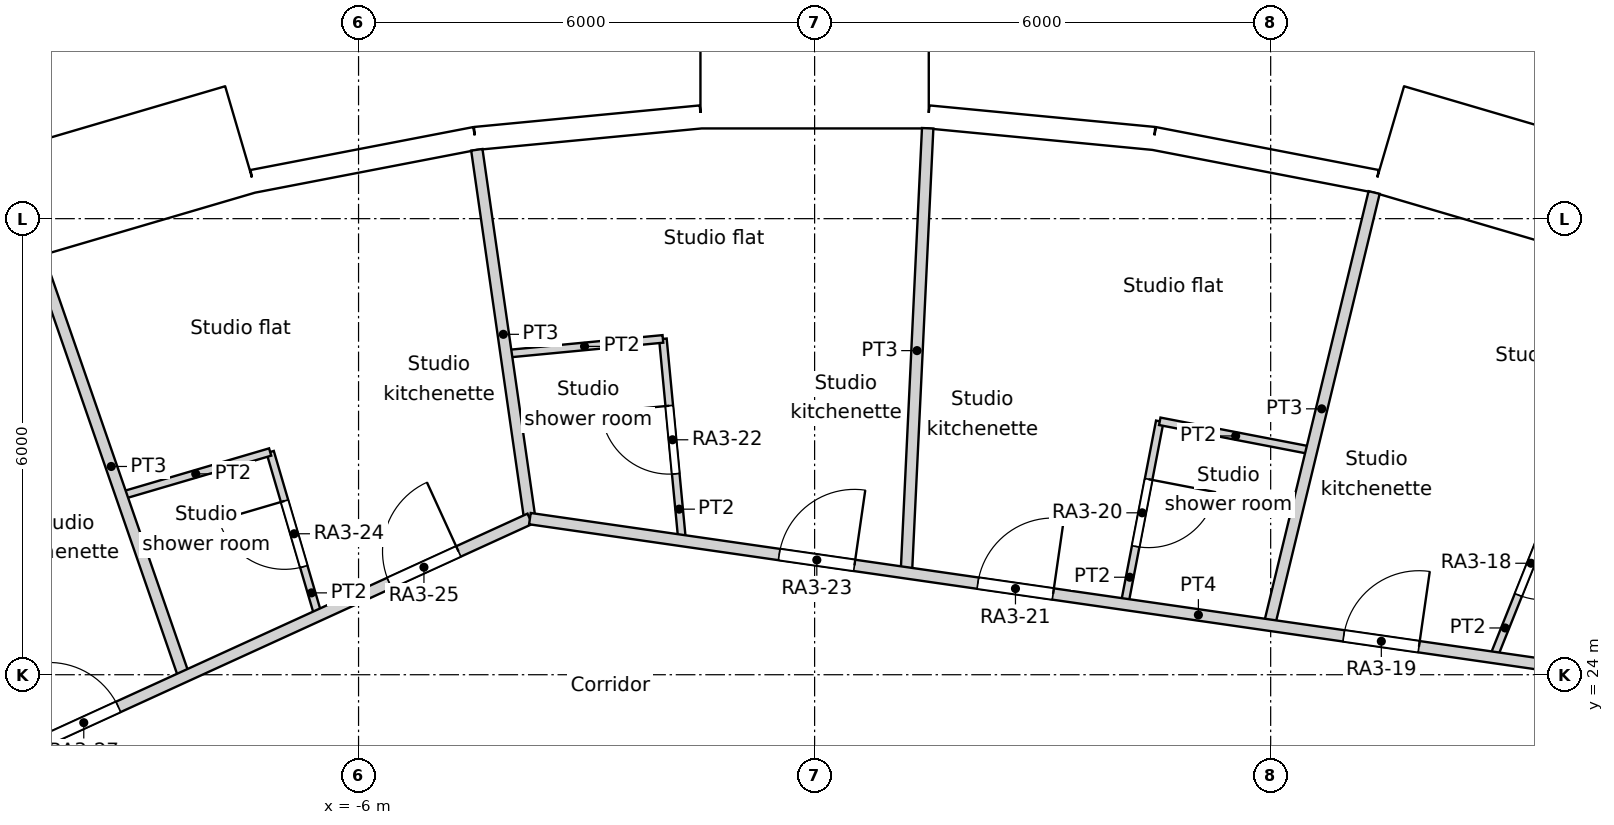
"""IFC4 building model, lengths in metres.
Left out: names, types, materials, properties, quantities, classifications, styles, units other than length and angle.
Written with IfcOpenShell. Run it as: python <this file> out.ifc"""

import sys

from ifc_helpers import new_model, si_unit, direction, frame, frame_2d, origin, origin_2d, place, context, subcontext, project, spatial, rectangle, circle, extrude, element, fill, save


model = new_model("IFC4")
c1 = context("Model", 3, precision=1e-05, world=origin(), true_north=direction((0.0, 1.0)))
c2 = subcontext(c1, "Body", "Model", "MODEL_VIEW")
j1 = project(units=[si_unit("LENGTHUNIT", "METRE"), si_unit("PLANEANGLEUNIT", "RADIAN")], contexts=[c1])
p1 = place(None, origin())
s1 = spatial("IfcSite", under=j1, at=p1, CompositionType="ELEMENT")
p2 = place(p1, origin())
s2 = spatial("IfcBuilding", under=s1, at=p2, CompositionType="ELEMENT")
p3 = place(p2, frame((0.0, 0.0, 49.8)))
s3 = spatial("IfcBuildingStorey", under=s2, at=p3, CompositionType="ELEMENT", Elevation=49.8)
for number, where, z_axis, x_axis in (
    (1, (7.137, 29.421, 0.0), (0.0, 0.0, 1.0), (1.0, 0.0, 0.0)),
    (2, (1.44, 30.24, 0.0), (0.0, 0.0, 1.0), (1.0, 0.0, 0.0)),
    (3, (-4.309, 29.966, 0.0), (0.0, 0.0, 1.0), (1.0, 0.0, 0.0)),
    (4, (-9.902, 28.61, 0.0), (0.0, 0.0, 1.0), (1.0, 0.0, 0.0)),
):
    element("IfcColumn", number, at=place(p3, frame(where, z_axis=z_axis, x_axis=x_axis)), inside=s3, PredefinedType="COLUMN", context=c2, shape_type="SweptSolid", body=[
        extrude(circle(Radius=0.7, at=origin_2d()), origin(), (0.0, 0.0, 1.0), 3.6),
    ])
for number, where, z_axis, x_axis in (
    (5, (9.723, 22.54, 0.0), (0.0, 0.0, 1.0), (1.0, 0.0, 0.0)),
    (6, (4.263, 24.175, 0.0), (0.0, 0.0, 1.0), (1.0, 0.0, 0.0)),
    (7, (-1.427, 24.506, 0.0), (0.0, 0.0, 1.0), (1.0, 0.0, 0.0)),
    (8, (-7.04, 23.516, 0.0), (0.0, 0.0, 1.0), (1.0, 0.0, 0.0)),
):
    element("IfcColumn", number, at=place(p3, frame(where, z_axis=z_axis, x_axis=x_axis)), inside=s3, PredefinedType="COLUMN", context=c2, shape_type="SweptSolid", body=[
        extrude(circle(Radius=0.75, at=origin_2d()), origin(), (0.0, 0.0, 1.0), 3.6),
    ])
p4 = place(p3, frame((10.43, 30.198, -0.45), z_axis=(0.0, 0.0, 1.0), x_axis=(-0.959489813418, 0.281743319258, 0.0)))
e9 = element("IfcWall", 9, at=p4, inside=s3, PredefinedType="ELEMENTEDWALL", context=c2, shape_type="SweptSolid", body=[
    extrude(rectangle(XDim=3.0, YDim=1.45, at=frame_2d((1.5, 0.0))), origin(), (0.0, 0.0, 1.0), 3.6),
])
p5 = place(p4, frame((1.5, 0.0, 2.0)))
e10 = element("IfcOpeningElement", 10, at=p5, cuts=e9, PredefinedType="OPENING", context=c2, shape_type="SweptSolid", body=[
    extrude(circle(Radius=0.9, at=origin_2d()), frame((0.0, 0.735, 0.0), z_axis=(0.0, -1.0, 0.0), x_axis=(1.0, 0.0, 0.0)), (0.0, 0.0, 1.0), 1.47),
])
p6 = place(p3, frame((7.391, 30.491, 0.0), z_axis=(0.0, 0.0, 1.0), x_axis=(-0.981924535406, 0.189272836848, 0.0)))
e11 = element("IfcWall", 11, at=p6, inside=s3, PredefinedType="SOLIDWALL", context=c2, shape_type="SweptSolid", body=[
    extrude(rectangle(XDim=2.98, YDim=0.3, at=frame_2d((1.49, 0.0))), origin(), (0.0, 0.0, 1.0), 3.15),
])
p7 = place(p6, frame((1.49, 0.0, 1.55)))
e12 = element("IfcOpeningElement", 12, at=p7, cuts=e11, PredefinedType="OPENING", context=c2, shape_type="SweptSolid", body=[
    extrude(circle(Radius=0.9, at=origin_2d()), frame((0.0, 0.16, 0.0), z_axis=(0.0, -1.0, 0.0), x_axis=(1.0, 0.0, 0.0)), (0.0, 0.0, 1.0), 0.32),
])
p8 = place(p3, frame((4.465, 31.055, 0.0), z_axis=(0.0, 0.0, 1.0), x_axis=(-0.995473351551, 0.095041077185, 0.0)))
e13 = element("IfcWall", 13, at=p8, inside=s3, PredefinedType="SOLIDWALL", context=c2, shape_type="SweptSolid", body=[
    extrude(rectangle(XDim=2.98, YDim=0.3, at=frame_2d((1.49, 0.0))), origin(), (0.0, 0.0, 1.0), 3.15),
])
p9 = place(p8, frame((1.49, 0.0, 1.55)))
e14 = element("IfcOpeningElement", 14, at=p9, cuts=e13, PredefinedType="OPENING", context=c2, shape_type="SweptSolid", body=[
    extrude(circle(Radius=0.9, at=origin_2d()), frame((0.0, 0.16, 0.0), z_axis=(0.0, -1.0, 0.0), x_axis=(1.0, 0.0, 0.0)), (0.0, 0.0, 1.0), 0.32),
])
p10 = place(p3, frame((1.5, 31.914, -0.45), z_axis=(0.0, 0.0, 1.0), x_axis=(-1.0, 0.0, 0.0)))
e15 = element("IfcWall", 15, at=p10, inside=s3, PredefinedType="ELEMENTEDWALL", context=c2, shape_type="SweptSolid", body=[
    extrude(rectangle(XDim=3.0, YDim=1.45, at=frame_2d((1.5, 0.0))), origin(), (0.0, 0.0, 1.0), 3.6),
])
p11 = place(p10, frame((1.5, 0.0, 2.0)))
e16 = element("IfcOpeningElement", 16, at=p11, cuts=e15, PredefinedType="OPENING", context=c2, shape_type="SweptSolid", body=[
    extrude(circle(Radius=0.9, at=origin_2d()), frame((0.0, 0.735, 0.0), z_axis=(0.0, -1.0, 0.0), x_axis=(1.0, 0.0, 0.0)), (0.0, 0.0, 1.0), 1.47),
])
p12 = place(p3, frame((-1.499, 31.338, 0.0), z_axis=(0.0, 0.0, 1.0), x_axis=(-0.995473351551, -0.095041077185, 0.0)))
e17 = element("IfcWall", 17, at=p12, inside=s3, PredefinedType="SOLIDWALL", context=c2, shape_type="SweptSolid", body=[
    extrude(rectangle(XDim=2.98, YDim=0.3, at=frame_2d((1.49, 0.0))), origin(), (0.0, 0.0, 1.0), 3.15),
])
p13 = place(p12, frame((1.49, 0.0, 1.55)))
e18 = element("IfcOpeningElement", 18, at=p13, cuts=e17, PredefinedType="OPENING", context=c2, shape_type="SweptSolid", body=[
    extrude(circle(Radius=0.9, at=origin_2d()), frame((0.0, 0.16, 0.0), z_axis=(0.0, -1.0, 0.0), x_axis=(1.0, 0.0, 0.0)), (0.0, 0.0, 1.0), 0.32),
])
p14 = place(p3, frame((-4.465, 31.055, 0.0), z_axis=(0.0, 0.0, 1.0), x_axis=(-0.981924535406, -0.189272836848, 0.0)))
e19 = element("IfcWall", 19, at=p14, inside=s3, PredefinedType="SOLIDWALL", context=c2, shape_type="SweptSolid", body=[
    extrude(rectangle(XDim=2.98, YDim=0.3, at=frame_2d((1.49, 0.0))), origin(), (0.0, 0.0, 1.0), 3.15),
])
p15 = place(p14, frame((1.49, 0.0, 1.55)))
e20 = element("IfcOpeningElement", 20, at=p15, cuts=e19, PredefinedType="OPENING", context=c2, shape_type="SweptSolid", body=[
    extrude(circle(Radius=0.9, at=origin_2d()), frame((0.0, 0.16, 0.0), z_axis=(0.0, -1.0, 0.0), x_axis=(1.0, 0.0, 0.0)), (0.0, 0.0, 1.0), 0.32),
])
p16 = place(p3, frame((-7.552, 31.044, -0.45), z_axis=(0.0, 0.0, 1.0), x_axis=(-0.959489813418, -0.281743319258, 0.0)))
e21 = element("IfcWall", 21, at=p16, inside=s3, PredefinedType="ELEMENTEDWALL", context=c2, shape_type="SweptSolid", body=[
    extrude(rectangle(XDim=3.0, YDim=1.45, at=frame_2d((1.5, 0.0))), origin(), (0.0, 0.0, 1.0), 3.6),
])
p17 = place(p16, frame((1.5, 0.0, 2.0)))
e22 = element("IfcOpeningElement", 22, at=p17, cuts=e21, PredefinedType="OPENING", context=c2, shape_type="SweptSolid", body=[
    extrude(circle(Radius=0.9, at=origin_2d()), frame((0.0, 0.735, 0.0), z_axis=(0.0, -1.0, 0.0), x_axis=(1.0, 0.0, 0.0)), (0.0, 0.0, 1.0), 1.47),
])
p18 = place(p3, frame((-3.746, 26.054, 0.0), z_axis=(0.0, 0.0, 1.0), x_axis=(0.989780545379, -0.142598990138, 0.0)))
e23 = element("IfcWall", 23, at=p18, inside=s3, PredefinedType="PARTITIONING", context=c2, shape_type="SweptSolid", body=[
    extrude(rectangle(XDim=14.83, YDim=0.15, at=frame_2d((7.415, 0.0))), origin(), (0.0, 0.0, 1.0), 3.15),
])
p19 = place(p18, frame((10.817, 0.0, 0.0)))
e24 = element("IfcOpeningElement", 24, at=p19, cuts=e23, PredefinedType="OPENING", context=c2, shape_type="SweptSolid", body=[
    extrude(rectangle(XDim=1.0, YDim=2.1, at=frame_2d((0.5, 1.05))), frame((0.0, 0.075, 0.0), z_axis=(0.0, -1.0, 0.0), x_axis=(1.0, 0.0, 0.0)), (0.0, 0.0, 1.0), 0.15),
])
p20 = place(p18, frame((5.954, 0.0, 0.0)))
e25 = element("IfcOpeningElement", 25, at=p20, cuts=e23, PredefinedType="OPENING", context=c2, shape_type="SweptSolid", body=[
    extrude(rectangle(XDim=1.0, YDim=2.1, at=frame_2d((0.5, 1.05))), frame((0.0, 0.075, 0.0), z_axis=(0.0, -1.0, 0.0), x_axis=(1.0, 0.0, 0.0)), (0.0, 0.0, 1.0), 0.15),
])
p21 = place(p18, frame((3.314, 0.0, 0.0)))
e26 = element("IfcOpeningElement", 26, at=p21, cuts=e23, PredefinedType="OPENING", context=c2, shape_type="SweptSolid", body=[
    extrude(rectangle(XDim=1.0, YDim=2.1, at=frame_2d((0.5, 1.05))), frame((0.0, 0.075, 0.0), z_axis=(0.0, -1.0, 0.0), x_axis=(1.0, 0.0, 0.0)), (0.0, 0.0, 1.0), 0.15),
])
p22 = place(p3, frame((-17.234, 19.888, 0.0), z_axis=(0.0, 0.0, 1.0), x_axis=(0.90953867323, 0.415619299238, 0.0)))
e27 = element("IfcWall", 27, at=p22, inside=s3, PredefinedType="PARTITIONING", context=c2, shape_type="SweptSolid", body=[
    extrude(rectangle(XDim=14.829, YDim=0.15, at=frame_2d((7.415, 0.0))), origin(), (0.0, 0.0, 1.0), 3.15),
])
p23 = place(p22, frame((12.797, 0.0, 0.0)))
e28 = element("IfcOpeningElement", 28, at=p23, cuts=e27, PredefinedType="OPENING", context=c2, shape_type="SweptSolid", body=[
    extrude(rectangle(XDim=1.0, YDim=2.1, at=frame_2d((0.5, 1.05))), frame((0.0, 0.075, 0.0), z_axis=(0.0, -1.0, 0.0), x_axis=(1.0, 0.0, 0.0)), (0.0, 0.0, 1.0), 0.15),
])
p24 = place(p22, frame((7.877, 0.0, 0.0)))
e29 = element("IfcOpeningElement", 29, at=p24, cuts=e27, PredefinedType="OPENING", context=c2, shape_type="SweptSolid", body=[
    extrude(rectangle(XDim=1.0, YDim=2.1, at=frame_2d((0.5, 1.05))), frame((0.0, 0.075, 0.0), z_axis=(0.0, -1.0, 0.0), x_axis=(1.0, 0.0, 0.0)), (0.0, 0.0, 1.0), 0.15),
])
p25 = place(p22, frame((1.604, 0.0, 0.0)))
e30 = element("IfcOpeningElement", 30, at=p25, cuts=e27, PredefinedType="OPENING", context=c2, shape_type="SweptSolid", body=[
    extrude(rectangle(XDim=1.8, YDim=2.1, at=frame_2d((0.9, 1.05))), frame((0.0, 0.075, 0.0), z_axis=(0.0, -1.0, 0.0), x_axis=(1.0, 0.0, 0.0)), (0.0, 0.0, 1.0), 0.15),
])
p26 = place(p3, frame((8.93, 24.228, 0.0), z_axis=(0.0, 0.0, 1.0), x_axis=(0.371564281805, 0.928407229876, 0.0)))
e31 = element("IfcWall", 31, at=p26, inside=s3, PredefinedType="PARTITIONING", context=c2, shape_type="SweptSolid", body=[
    extrude(rectangle(XDim=2.667, YDim=0.1, at=frame_2d((1.333, 0.0))), origin(), (0.0, 0.0, 1.0), 3.15),
])
p27 = place(p26, frame((0.884, 0.0, 0.0)))
e32 = element("IfcOpeningElement", 32, at=p27, cuts=e31, PredefinedType="OPENING", context=c2, shape_type="SweptSolid", body=[
    extrude(rectangle(XDim=0.9, YDim=2.04, at=frame_2d((0.45, 1.02))), frame((0.0, 0.05, 0.0), z_axis=(0.0, -1.0, 0.0), x_axis=(1.0, 0.0, 0.0)), (0.0, 0.0, 1.0), 0.1),
])
p28 = place(p3, frame((5.981, 24.652, 0.0), z_axis=(0.0, 0.0, 1.0), x_axis=(0.235555883074, 0.971860805851, 0.0)))
e33 = element("IfcWall", 33, at=p28, inside=s3, PredefinedType="PARTITIONING", context=c2, shape_type="SweptSolid", body=[
    extrude(rectangle(XDim=5.857, YDim=0.15, at=frame_2d((2.928, 0.0))), origin(), (0.0, 0.0, 1.0), 3.15),
])
p29 = place(p3, frame((4.541, 27.334, 0.0), z_axis=(0.0, 0.0, 1.0), x_axis=(0.981919009751, -0.189301501024, 0.0)))
e34 = element("IfcWall", 34, at=p29, inside=s3, PredefinedType="PARTITIONING", context=c2, shape_type="SweptSolid", body=[
    extrude(rectangle(XDim=2.034, YDim=0.1, at=frame_2d((1.017, 0.0))), origin(), (0.0, 0.0, 1.0), 3.15),
])
p30 = place(p3, frame((4.077, 24.926, 0.0), z_axis=(0.0, 0.0, 1.0), x_axis=(0.18925724964, 0.981927539821, 0.0)))
e35 = element("IfcWall", 35, at=p30, inside=s3, PredefinedType="PARTITIONING", context=c2, shape_type="SweptSolid", body=[
    extrude(rectangle(XDim=2.452, YDim=0.1, at=frame_2d((1.226, 0.0))), origin(), (0.0, 0.0, 1.0), 3.15),
])
p31 = place(p30, frame((0.776, 0.0, 0.0)))
e36 = element("IfcOpeningElement", 36, at=p31, cuts=e35, PredefinedType="OPENING", context=c2, shape_type="SweptSolid", body=[
    extrude(rectangle(XDim=0.9, YDim=2.04, at=frame_2d((0.45, 1.02))), frame((0.0, 0.05, 0.0), z_axis=(0.0, -1.0, 0.0), x_axis=(1.0, 0.0, 0.0)), (0.0, 0.0, 1.0), 0.1),
])
p32 = place(p3, frame((1.207, 25.339, 0.0), z_axis=(0.0, 0.0, 1.0), x_axis=(0.04789788494, 0.99885223763, 0.0)))
e37 = element("IfcWall", 37, at=p32, inside=s3, PredefinedType="PARTITIONING", context=c2, shape_type="SweptSolid", body=[
    extrude(rectangle(XDim=5.857, YDim=0.15, at=frame_2d((2.928, 0.0))), origin(), (0.0, 0.0, 1.0), 3.15),
])
p33 = place(p3, frame((-1.996, 28.418, 0.0), z_axis=(0.0, 0.0, 1.0), x_axis=(0.094925726797, -0.995484357683, 0.0)))
e38 = element("IfcWall", 38, at=p33, inside=s3, PredefinedType="PARTITIONING", context=c2, shape_type="SweptSolid", body=[
    extrude(rectangle(XDim=2.667, YDim=0.1, at=frame_2d((1.333, 0.0))), origin(), (0.0, 0.0, 1.0), 3.15),
])
p34 = place(p33, frame((0.883, 0.0, 0.0)))
e39 = element("IfcOpeningElement", 39, at=p34, cuts=e38, PredefinedType="OPENING", context=c2, shape_type="SweptSolid", body=[
    extrude(rectangle(XDim=0.9, YDim=2.04, at=frame_2d((0.45, 1.02))), frame((0.0, 0.05, 0.0), z_axis=(0.0, -1.0, 0.0), x_axis=(1.0, 0.0, 0.0)), (0.0, 0.0, 1.0), 0.1),
])
p35 = place(p3, frame((-4.058, 28.221, 0.0), z_axis=(0.0, 0.0, 1.0), x_axis=(0.995466291052, 0.095115000814, 0.0)))
e40 = element("IfcWall", 40, at=p35, inside=s3, PredefinedType="PARTITIONING", context=c2, shape_type="SweptSolid", body=[
    extrude(rectangle(XDim=2.071, YDim=0.1, at=frame_2d((1.036, 0.0))), origin(), (0.0, 0.0, 1.0), 3.15),
])
p36 = place(p3, frame((-4.444, 30.906, 0.0), z_axis=(0.0, 0.0, 1.0), x_axis=(0.142104219222, -0.989851701458, 0.0)))
e41 = element("IfcWall", 41, at=p36, inside=s3, PredefinedType="PARTITIONING", context=c2, shape_type="SweptSolid", body=[
    extrude(rectangle(XDim=4.905, YDim=0.15, at=frame_2d((2.453, 0.0))), origin(), (0.0, 0.0, 1.0), 3.15),
])
p37 = place(p3, frame((-7.163, 26.93, 0.0), z_axis=(0.0, 0.0, 1.0), x_axis=(0.281948165188, -0.959429638977, 0.0)))
e42 = element("IfcWall", 42, at=p37, inside=s3, PredefinedType="PARTITIONING", context=c2, shape_type="SweptSolid", body=[
    extrude(rectangle(XDim=2.242, YDim=0.1, at=frame_2d((1.121, 0.0))), origin(), (0.0, 0.0, 1.0), 3.15),
])
p38 = place(p37, frame((0.671, 0.0, 0.0)))
e43 = element("IfcOpeningElement", 43, at=p38, cuts=e42, PredefinedType="OPENING", context=c2, shape_type="SweptSolid", body=[
    extrude(rectangle(XDim=0.9, YDim=2.04, at=frame_2d((0.45, 1.02))), frame((0.0, 0.05, 0.0), z_axis=(0.0, -1.0, 0.0), x_axis=(1.0, 0.0, 0.0)), (0.0, 0.0, 1.0), 0.1),
])
p39 = place(p3, frame((-9.121, 26.355, 0.0), z_axis=(0.0, 0.0, 1.0), x_axis=(0.95948923736, 0.281745281045, 0.0)))
e44 = element("IfcWall", 44, at=p39, inside=s3, PredefinedType="PARTITIONING", context=c2, shape_type="SweptSolid", body=[
    extrude(rectangle(XDim=2.041, YDim=0.1, at=frame_2d((1.021, 0.0))), origin(), (0.0, 0.0, 1.0), 3.15),
])
p40 = place(p3, frame((-10.212, 29.507, 0.0), z_axis=(0.0, 0.0, 1.0), x_axis=(0.327223665968, -0.944946915139, 0.0)))
e45 = element("IfcWall", 45, at=p40, inside=s3, PredefinedType="PARTITIONING", context=c2, shape_type="SweptSolid", body=[
    extrude(rectangle(XDim=5.857, YDim=0.15, at=frame_2d((2.928, 0.0))), origin(), (0.0, 0.0, 1.0), 3.15),
])
p41 = place(p5, origin())
e46 = element("IfcWindow", 46, at=p41, inside=s3, PartitioningType="SINGLE_PANEL", PredefinedType="WINDOW", context=c2, shape_type="SweptSolid", body=[
    extrude(circle(Radius=0.9, at=origin_2d()), frame((0.0, 0.695, 0.0), z_axis=(0.0, -1.0, 0.0), x_axis=(1.0, 0.0, 0.0)), (0.0, 0.0, 1.0), 0.1),
])
fill(e10, e46)
p42 = place(p7, origin())
e47 = element("IfcWindow", 47, at=p42, inside=s3, PartitioningType="SINGLE_PANEL", PredefinedType="WINDOW", context=c2, shape_type="SweptSolid", body=[
    extrude(circle(Radius=0.9, at=origin_2d()), frame((0.0, 0.12, 0.0), z_axis=(0.0, -1.0, 0.0), x_axis=(1.0, 0.0, 0.0)), (0.0, 0.0, 1.0), 0.1),
])
fill(e12, e47)
p43 = place(p9, origin())
e48 = element("IfcWindow", 48, at=p43, inside=s3, PartitioningType="SINGLE_PANEL", PredefinedType="WINDOW", context=c2, shape_type="SweptSolid", body=[
    extrude(circle(Radius=0.9, at=origin_2d()), frame((0.0, 0.12, 0.0), z_axis=(0.0, -1.0, 0.0), x_axis=(1.0, 0.0, 0.0)), (0.0, 0.0, 1.0), 0.1),
])
fill(e14, e48)
p44 = place(p11, origin())
e49 = element("IfcWindow", 49, at=p44, inside=s3, PartitioningType="SINGLE_PANEL", PredefinedType="WINDOW", context=c2, shape_type="SweptSolid", body=[
    extrude(circle(Radius=0.9, at=origin_2d()), frame((0.0, 0.695, 0.0), z_axis=(0.0, -1.0, 0.0), x_axis=(1.0, 0.0, 0.0)), (0.0, 0.0, 1.0), 0.1),
])
fill(e16, e49)
p45 = place(p13, origin())
e50 = element("IfcWindow", 50, at=p45, inside=s3, PartitioningType="SINGLE_PANEL", PredefinedType="WINDOW", context=c2, shape_type="SweptSolid", body=[
    extrude(circle(Radius=0.9, at=origin_2d()), frame((0.0, 0.12, 0.0), z_axis=(0.0, -1.0, 0.0), x_axis=(1.0, 0.0, 0.0)), (0.0, 0.0, 1.0), 0.1),
])
fill(e18, e50)
p46 = place(p15, origin())
e51 = element("IfcWindow", 51, at=p46, inside=s3, PartitioningType="SINGLE_PANEL", PredefinedType="WINDOW", context=c2, shape_type="SweptSolid", body=[
    extrude(circle(Radius=0.9, at=origin_2d()), frame((0.0, 0.12, 0.0), z_axis=(0.0, -1.0, 0.0), x_axis=(1.0, 0.0, 0.0)), (0.0, 0.0, 1.0), 0.1),
])
fill(e20, e51)
p47 = place(p17, origin())
e52 = element("IfcWindow", 52, at=p47, inside=s3, PartitioningType="SINGLE_PANEL", PredefinedType="WINDOW", context=c2, shape_type="SweptSolid", body=[
    extrude(circle(Radius=0.9, at=origin_2d()), frame((0.0, 0.695, 0.0), z_axis=(0.0, -1.0, 0.0), x_axis=(1.0, 0.0, 0.0)), (0.0, 0.0, 1.0), 0.1),
])
fill(e22, e52)
p48 = place(p27, origin())
e53 = element("IfcDoor", 53, at=p48, inside=s3, OperationType="SINGLE_SWING_LEFT", PredefinedType="DOOR", context=c2, shape_type="SweptSolid", body=[
    extrude(rectangle(XDim=0.9, YDim=2.04, at=frame_2d((0.45, 1.02))), frame((0.0, 0.025, 0.0), z_axis=(0.0, -1.0, 0.0), x_axis=(1.0, 0.0, 0.0)), (0.0, 0.0, 1.0), 0.05),
])
fill(e32, e53)
p49 = place(p19, origin())
e54 = element("IfcDoor", 54, at=p49, inside=s3, OperationType="SINGLE_SWING_RIGHT", PredefinedType="DOOR", context=c2, shape_type="SweptSolid", body=[
    extrude(rectangle(XDim=1.0, YDim=2.1, at=frame_2d((0.5, 1.05))), frame((0.0, 0.025, 0.0), z_axis=(0.0, -1.0, 0.0), x_axis=(1.0, 0.0, 0.0)), (0.0, 0.0, 1.0), 0.05),
])
fill(e24, e54)
p50 = place(p31, origin())
e55 = element("IfcDoor", 55, at=p50, inside=s3, OperationType="SINGLE_SWING_LEFT", PredefinedType="DOOR", context=c2, shape_type="SweptSolid", body=[
    extrude(rectangle(XDim=0.9, YDim=2.04, at=frame_2d((0.45, 1.02))), frame((0.0, 0.025, 0.0), z_axis=(0.0, -1.0, 0.0), x_axis=(1.0, 0.0, 0.0)), (0.0, 0.0, 1.0), 0.05),
])
fill(e36, e55)
p51 = place(p20, origin())
e56 = element("IfcDoor", 56, at=p51, inside=s3, OperationType="SINGLE_SWING_RIGHT", PredefinedType="DOOR", context=c2, shape_type="SweptSolid", body=[
    extrude(rectangle(XDim=1.0, YDim=2.1, at=frame_2d((0.5, 1.05))), frame((0.0, 0.025, 0.0), z_axis=(0.0, -1.0, 0.0), x_axis=(1.0, 0.0, 0.0)), (0.0, 0.0, 1.0), 0.05),
])
fill(e25, e56)
p52 = place(p34, origin())
e57 = element("IfcDoor", 57, at=p52, inside=s3, OperationType="SINGLE_SWING_RIGHT", PredefinedType="DOOR", context=c2, shape_type="SweptSolid", body=[
    extrude(rectangle(XDim=0.9, YDim=2.04, at=frame_2d((0.45, 1.02))), frame((0.0, 0.025, 0.0), z_axis=(0.0, -1.0, 0.0), x_axis=(1.0, 0.0, 0.0)), (0.0, 0.0, 1.0), 0.05),
])
fill(e39, e57)
p53 = place(p21, origin())
e58 = element("IfcDoor", 58, at=p53, inside=s3, OperationType="SINGLE_SWING_RIGHT", PredefinedType="DOOR", context=c2, shape_type="SweptSolid", body=[
    extrude(rectangle(XDim=1.0, YDim=2.1, at=frame_2d((0.5, 1.05))), frame((0.0, 0.025, 0.0), z_axis=(0.0, -1.0, 0.0), x_axis=(1.0, 0.0, 0.0)), (0.0, 0.0, 1.0), 0.05),
])
fill(e26, e58)
p54 = place(p38, origin())
e59 = element("IfcDoor", 59, at=p54, inside=s3, OperationType="SINGLE_SWING_RIGHT", PredefinedType="DOOR", context=c2, shape_type="SweptSolid", body=[
    extrude(rectangle(XDim=0.9, YDim=2.04, at=frame_2d((0.45, 1.02))), frame((0.0, 0.025, 0.0), z_axis=(0.0, -1.0, 0.0), x_axis=(1.0, 0.0, 0.0)), (0.0, 0.0, 1.0), 0.05),
])
fill(e43, e59)
p55 = place(p23, origin())
e60 = element("IfcDoor", 60, at=p55, inside=s3, OperationType="SINGLE_SWING_RIGHT", PredefinedType="DOOR", context=c2, shape_type="SweptSolid", body=[
    extrude(rectangle(XDim=1.0, YDim=2.1, at=frame_2d((0.5, 1.05))), frame((0.0, 0.025, 0.0), z_axis=(0.0, -1.0, 0.0), x_axis=(1.0, 0.0, 0.0)), (0.0, 0.0, 1.0), 0.05),
])
fill(e28, e60)
p56 = place(p24, origin())
e61 = element("IfcDoor", 61, at=p56, inside=s3, OperationType="SINGLE_SWING_LEFT", PredefinedType="DOOR", context=c2, shape_type="SweptSolid", body=[
    extrude(rectangle(XDim=1.0, YDim=2.1, at=frame_2d((0.5, 1.05))), frame((0.0, 0.025, 0.0), z_axis=(0.0, -1.0, 0.0), x_axis=(1.0, 0.0, 0.0)), (0.0, 0.0, 1.0), 0.05),
])
fill(e29, e61)
save(model, sys.argv[1])
